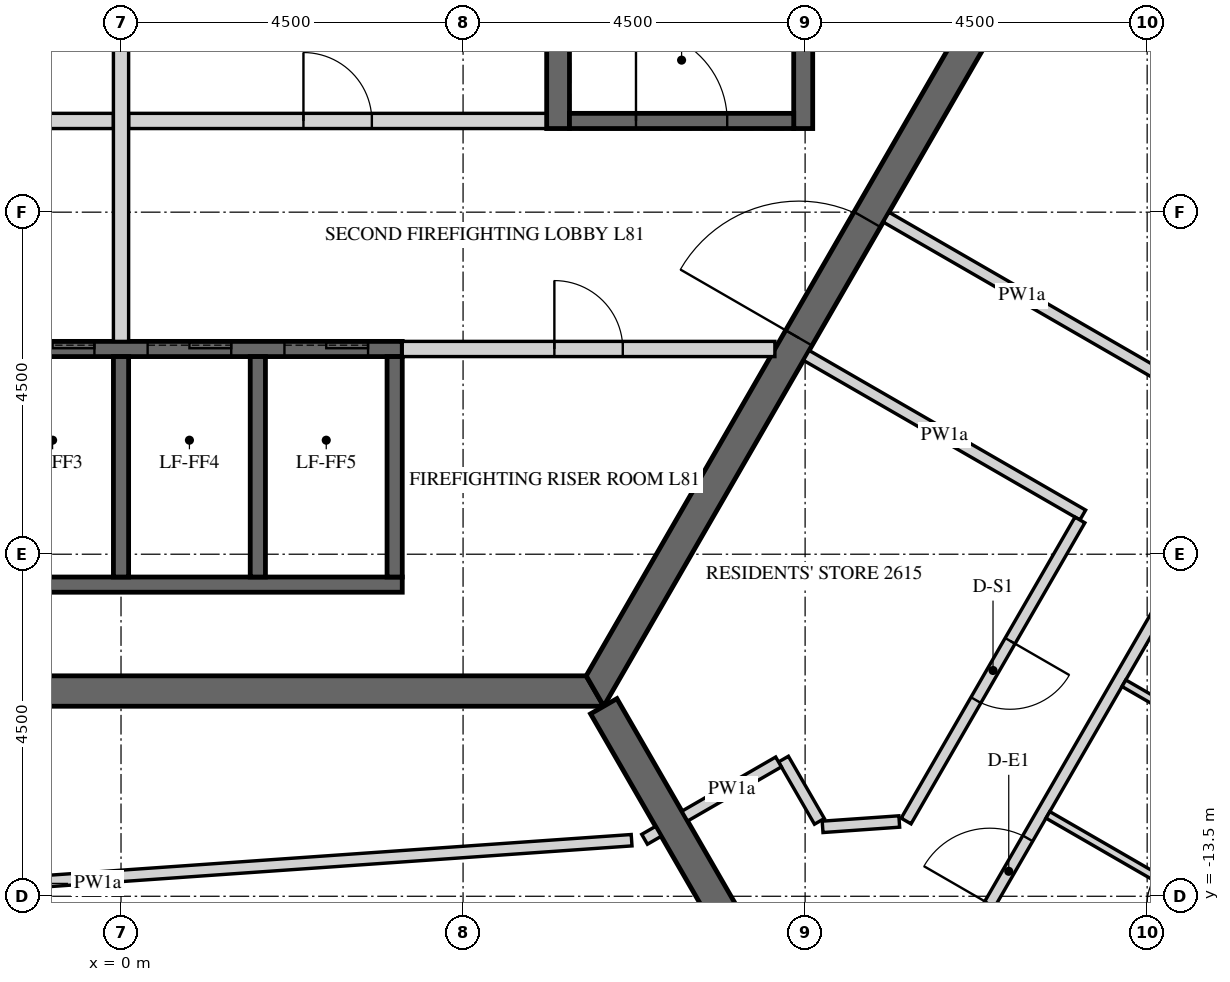
"""IFC4 building model, lengths in metres.
Left out: names, types, materials, properties, quantities, classifications, styles, units other than length and angle.
Written with IfcOpenShell. Run it as: python <this file> out.ifc"""

import sys

from ifc_helpers import new_model, si_unit, direction, frame, frame_2d, origin, place, context, subcontext, project, spatial, polyline, rectangle, outline, extrude, element, fill, save


model = new_model("IFC4")
c1 = context("Model", 3, precision=1e-05, world=origin(), true_north=direction((0.0, 1.0)))
c2 = subcontext(c1, "Body", "Model", "MODEL_VIEW")
j1 = project(units=[si_unit("LENGTHUNIT", "METRE"), si_unit("PLANEANGLEUNIT", "RADIAN")], contexts=[c1])
p1 = place(None, origin())
s1 = spatial("IfcSite", under=j1, at=p1, CompositionType="ELEMENT")
p2 = place(p1, origin())
s2 = spatial("IfcBuilding", under=s1, at=p2, CompositionType="ELEMENT")
p3 = place(p2, frame((0.0, 0.0, 334.2)))
s3 = spatial("IfcBuildingStorey", under=s2, at=p3, CompositionType="ELEMENT", Elevation=334.2)
p4 = place(p3, frame((-6.235, -10.8, -0.15), z_axis=(0.0, 0.0, 1.0), x_axis=(1.0, 0.0, 0.0)))
e1 = element("IfcWall", 1, at=p4, inside=s3, PredefinedType="SHEAR", context=c2, shape_type="SweptSolid", body=[
    extrude(outline(polyline([(-0.115, -0.2), (12.586, -0.2), (12.355, 0.2), (0.115, 0.2), (-0.115, -0.2)])), origin(), (0.0, 0.0, 1.0), 3.75),
])
p5 = place(p3, frame((6.235, -10.8, -0.15), z_axis=(0.0, 0.0, 1.0), x_axis=(0.499996419489, 0.866027470984, 0.0)))
e2 = element("IfcWall", 2, at=p5, inside=s3, PredefinedType="SHEAR", context=c2, shape_type="SweptSolid", body=[
    extrude(outline(polyline([(-0.115, -0.2), (12.586, -0.2), (12.355, 0.2), (0.115, 0.2), (-0.115, -0.2)])), origin(), (0.0, 0.0, 1.0), 3.75),
])
p6 = place(p5, frame((5.364, 0.0, 0.15)))
e3 = element("IfcOpeningElement", 3, at=p6, cuts=e2, PredefinedType="OPENING", context=c2, shape_type="SweptSolid", body=[
    extrude(rectangle(XDim=1.8, YDim=2.4, at=frame_2d((0.9, 1.2))), frame((0.0, 0.21, 0.0), z_axis=(0.0, -1.0, 0.0), x_axis=(1.0, 0.0, 0.0)), (0.0, 0.0, 1.0), 0.42),
])
p7 = place(p3, frame((6.351, -11.0, -0.15), z_axis=(0.0, 0.0, 1.0), x_axis=(0.499998894578, -0.866026041999, 0.0)))
e4 = element("IfcWall", 4, at=p7, inside=s3, PredefinedType="SHEAR", context=c2, shape_type="SweptSolid", body=[
    extrude(rectangle(XDim=15.544, YDim=0.4, at=frame_2d((7.772, 0.0))), origin(), (0.0, 0.0, 1.0), 3.75),
])
p8 = place(p7, frame((6.872, 0.0, 0.15)))
e5 = element("IfcOpeningElement", 5, at=p8, cuts=e4, PredefinedType="OPENING", context=c2, shape_type="SweptSolid", body=[
    extrude(rectangle(XDim=1.8, YDim=2.4, at=frame_2d((0.9, 1.2))), frame((0.0, 0.21, 0.0), z_axis=(0.0, -1.0, 0.0), x_axis=(1.0, 0.0, 0.0)), (0.0, 0.0, 1.0), 0.42),
])
p9 = place(p3, frame((-5.5, -6.3, -0.25), z_axis=(0.0, 0.0, 1.0), x_axis=(1.0, 0.0, 0.0)))
e6 = element("IfcWall", 6, at=p9, inside=s3, PredefinedType="SHEAR", context=c2, shape_type="SweptSolid", body=[
    extrude(rectangle(XDim=9.2, YDim=0.2, at=frame_2d((4.6, 0.0))), origin(), (0.0, 0.0, 1.0), 3.9),
])
p10 = place(p9, frame((0.45, 0.0, 0.25)))
e7 = element("IfcOpeningElement", 7, at=p10, cuts=e6, PredefinedType="OPENING", context=c2, shape_type="SweptSolid", body=[
    extrude(rectangle(XDim=1.1, YDim=2.1, at=frame_2d((0.55, 1.05))), frame((0.0, 0.11, 0.0), z_axis=(0.0, -1.0, 0.0), x_axis=(1.0, 0.0, 0.0)), (0.0, 0.0, 1.0), 0.22),
])
p11 = place(p9, frame((2.25, 0.0, 0.25)))
e8 = element("IfcOpeningElement", 8, at=p11, cuts=e6, PredefinedType="OPENING", context=c2, shape_type="SweptSolid", body=[
    extrude(rectangle(XDim=1.1, YDim=2.1, at=frame_2d((0.55, 1.05))), frame((0.0, 0.11, 0.0), z_axis=(0.0, -1.0, 0.0), x_axis=(1.0, 0.0, 0.0)), (0.0, 0.0, 1.0), 0.22),
])
p12 = place(p9, frame((4.05, 0.0, 0.25)))
e9 = element("IfcOpeningElement", 9, at=p12, cuts=e6, PredefinedType="OPENING", context=c2, shape_type="SweptSolid", body=[
    extrude(rectangle(XDim=1.1, YDim=2.1, at=frame_2d((0.55, 1.05))), frame((0.0, 0.11, 0.0), z_axis=(0.0, -1.0, 0.0), x_axis=(1.0, 0.0, 0.0)), (0.0, 0.0, 1.0), 0.22),
])
p13 = place(p9, frame((5.85, 0.0, 0.25)))
e10 = element("IfcOpeningElement", 10, at=p13, cuts=e6, PredefinedType="OPENING", context=c2, shape_type="SweptSolid", body=[
    extrude(rectangle(XDim=1.1, YDim=2.1, at=frame_2d((0.55, 1.05))), frame((0.0, 0.11, 0.0), z_axis=(0.0, -1.0, 0.0), x_axis=(1.0, 0.0, 0.0)), (0.0, 0.0, 1.0), 0.22),
])
p14 = place(p9, frame((7.65, 0.0, 0.25)))
e11 = element("IfcOpeningElement", 11, at=p14, cuts=e6, PredefinedType="OPENING", context=c2, shape_type="SweptSolid", body=[
    extrude(rectangle(XDim=1.1, YDim=2.1, at=frame_2d((0.55, 1.05))), frame((0.0, 0.11, 0.0), z_axis=(0.0, -1.0, 0.0), x_axis=(1.0, 0.0, 0.0)), (0.0, 0.0, 1.0), 0.22),
])
p15 = place(p3, frame((-5.5, -9.4, -0.25), z_axis=(0.0, 0.0, 1.0), x_axis=(1.0, 0.0, 0.0)))
e12 = element("IfcWall", 12, at=p15, inside=s3, PredefinedType="SHEAR", context=c2, shape_type="SweptSolid", body=[
    extrude(rectangle(XDim=9.2, YDim=0.2, at=frame_2d((4.6, 0.0))), origin(), (0.0, 0.0, 1.0), 3.9),
])
for number, where, z_axis, x_axis in (
    (13, (0.0, -9.3, -0.25), (0.0, 0.0, 1.0), (0.0, 1.0, 0.0)),
    (14, (1.8, -9.3, -0.25), (0.0, 0.0, 1.0), (0.0, 1.0, 0.0)),
    (15, (3.6, -9.3, -0.25), (0.0, 0.0, 1.0), (0.0, 1.0, 0.0)),
):
    element("IfcWall", number, at=place(p3, frame(where, z_axis=z_axis, x_axis=x_axis)), inside=s3, PredefinedType="SHEAR", context=c2, shape_type="SweptSolid", body=[
        extrude(rectangle(XDim=2.9, YDim=0.2, at=frame_2d((1.45, 0.0))), origin(), (0.0, 0.0, 1.0), 3.9),
    ])
p16 = place(p3, frame((-5.6, -3.3, 0.0), z_axis=(0.0, 0.0, 1.0), x_axis=(1.0, 0.0, 0.0)))
e16 = element("IfcWall", 16, at=p16, inside=s3, PredefinedType="PARTITIONING", context=c2, shape_type="SweptSolid", body=[
    extrude(rectangle(XDim=5.5, YDim=0.2, at=frame_2d((2.75, 0.0))), origin(), (0.0, 0.0, 1.0), 3.65),
])
p17 = place(p16, frame((2.3, 0.0, 0.0)))
e17 = element("IfcOpeningElement", 17, at=p17, cuts=e16, PredefinedType="OPENING", context=c2, shape_type="SweptSolid", body=[
    extrude(rectangle(XDim=0.9, YDim=2.1, at=frame_2d((0.45, 1.05))), frame((0.0, 0.11, 0.0), z_axis=(0.0, -1.0, 0.0), x_axis=(1.0, 0.0, 0.0)), (0.0, 0.0, 1.0), 0.22),
])
p18 = place(p3, frame((0.1, -3.3, 0.0), z_axis=(0.0, 0.0, 1.0), x_axis=(1.0, 0.0, 0.0)))
e18 = element("IfcWall", 18, at=p18, inside=s3, PredefinedType="PARTITIONING", context=c2, shape_type="SweptSolid", body=[
    extrude(rectangle(XDim=5.5, YDim=0.2, at=frame_2d((2.75, 0.0))), origin(), (0.0, 0.0, 1.0), 3.65),
])
p19 = place(p18, frame((2.3, 0.0, 0.0)))
e19 = element("IfcOpeningElement", 19, at=p19, cuts=e18, PredefinedType="OPENING", context=c2, shape_type="SweptSolid", body=[
    extrude(rectangle(XDim=0.9, YDim=2.1, at=frame_2d((0.45, 1.05))), frame((0.0, 0.11, 0.0), z_axis=(0.0, -1.0, 0.0), x_axis=(1.0, 0.0, 0.0)), (0.0, 0.0, 1.0), 0.22),
])
p20 = place(p3, frame((0.0, -6.2, 0.0), z_axis=(0.0, 0.0, 1.0), x_axis=(0.0, 1.0, 0.0)))
e20 = element("IfcWall", 20, at=p20, inside=s3, PredefinedType="PARTITIONING", context=c2, shape_type="SweptSolid", body=[
    extrude(rectangle(XDim=6.1, YDim=0.2, at=frame_2d((3.05, 0.0))), origin(), (0.0, 0.0, 1.0), 3.65),
])
p21 = place(p3, frame((3.7, -6.3, 0.0), z_axis=(0.0, 0.0, 1.0), x_axis=(1.0, 0.0, 0.0)))
e21 = element("IfcWall", 21, at=p21, inside=s3, PredefinedType="PARTITIONING", context=c2, shape_type="SweptSolid", body=[
    extrude(rectangle(XDim=4.903, YDim=0.2, at=frame_2d((2.451, 0.0))), origin(), (0.0, 0.0, 1.0), 3.65),
])
p22 = place(p21, frame((2.001, 0.0, 0.0)))
e22 = element("IfcOpeningElement", 22, at=p22, cuts=e21, PredefinedType="OPENING", context=c2, shape_type="SweptSolid", body=[
    extrude(rectangle(XDim=0.9, YDim=2.1, at=frame_2d((0.45, 1.05))), frame((0.0, 0.11, 0.0), z_axis=(0.0, -1.0, 0.0), x_axis=(1.0, 0.0, 0.0)), (0.0, 0.0, 1.0), 0.22),
])
p23 = place(p3, frame((5.75, -3.4, -0.25), z_axis=(0.0, 0.0, 1.0), x_axis=(0.0, 1.0, 0.0)))
e23 = element("IfcWall", 23, at=p23, inside=s3, PredefinedType="SHEAR", context=c2, shape_type="SweptSolid", body=[
    extrude(rectangle(XDim=6.8, YDim=0.3, at=frame_2d((3.4, 0.0))), origin(), (0.0, 0.0, 1.0), 3.9),
])
p24 = place(p3, frame((8.975, -3.4, -0.25), z_axis=(0.0, 0.0, 1.0), x_axis=(0.0, 1.0, 0.0)))
e24 = element("IfcWall", 24, at=p24, inside=s3, PredefinedType="SHEAR", context=c2, shape_type="SweptSolid", body=[
    extrude(rectangle(XDim=6.8, YDim=0.25, at=frame_2d((3.4, 0.0))), origin(), (0.0, 0.0, 1.0), 3.9),
])
p25 = place(p3, frame((5.9, -3.3, -0.25), z_axis=(0.0, 0.0, 1.0), x_axis=(1.0, 0.0, 0.0)))
e25 = element("IfcWall", 25, at=p25, inside=s3, PredefinedType="SHEAR", context=c2, shape_type="SweptSolid", body=[
    extrude(rectangle(XDim=2.95, YDim=0.2, at=frame_2d((1.475, 0.0))), origin(), (0.0, 0.0, 1.0), 3.9),
])
p26 = place(p25, frame((0.875, 0.0, 0.25)))
e26 = element("IfcOpeningElement", 26, at=p26, cuts=e25, PredefinedType="OPENING", context=c2, shape_type="SweptSolid", body=[
    extrude(rectangle(XDim=1.2, YDim=2.4, at=frame_2d((0.6, 1.2))), frame((0.0, 0.11, 0.0), z_axis=(0.0, -1.0, 0.0), x_axis=(1.0, 0.0, 0.0)), (0.0, 0.0, 1.0), 0.22),
])
p27 = place(p3, frame((7.07, -12.646, 0.0), z_axis=(0.0, 0.0, 1.0), x_axis=(-0.866378867349, -0.499387282788, 0.0)))
e27 = element("IfcWall", 27, at=p27, inside=s3, PredefinedType="PARTITIONING", context=c2, shape_type="SweptSolid", body=[
    extrude(rectangle(XDim=0.21, YDim=0.15, at=frame_2d((0.105, 0.0))), origin(), (0.0, 0.0, 1.0), 2.838),
])
p28 = place(p3, frame((6.717, -12.762, 0.0), z_axis=(0.0, 0.0, 1.0), x_axis=(-0.99756375843, -0.069760646978, 0.0)))
e28 = element("IfcWall", 28, at=p28, inside=s3, PredefinedType="PARTITIONING", context=c2, shape_type="SweptSolid", body=[
    extrude(rectangle(XDim=16.284, YDim=0.15, at=frame_2d((8.142, 0.0))), origin(), (0.0, 0.0, 1.0), 2.838),
])
p29 = place(p28, frame((7.692, 0.0, 0.0)))
e29 = element("IfcOpeningElement", 29, at=p29, cuts=e28, PredefinedType="OPENING", context=c2, shape_type="SweptSolid", body=[
    extrude(rectangle(XDim=0.9, YDim=2.1, at=frame_2d((0.45, 1.05))), frame((0.0, 0.085, 0.0), z_axis=(0.0, -1.0, 0.0), x_axis=(1.0, 0.0, 0.0)), (0.0, 0.0, 1.0), 0.17),
])
p30 = place(p3, frame((11.229, -13.951, 0.0), z_axis=(0.0, 0.0, 1.0), x_axis=(0.499997948852, 0.866026588012, 0.0)))
e30 = element("IfcWall", 30, at=p30, inside=s3, PredefinedType="PARTITIONING", context=c2, shape_type="SweptSolid", body=[
    extrude(rectangle(XDim=14.677, YDim=0.15, at=frame_2d((7.339, 0.0))), origin(), (0.0, 0.0, 1.0), 2.838),
])
p31 = place(p30, frame((0.4, 0.0, 0.0)))
e31 = element("IfcOpeningElement", 31, at=p31, cuts=e30, PredefinedType="OPENING", context=c2, shape_type="SweptSolid", body=[
    extrude(rectangle(XDim=1.0, YDim=2.1, at=frame_2d((0.5, 1.05))), frame((0.0, 0.085, 0.0), z_axis=(0.0, -1.0, 0.0), x_axis=(1.0, 0.0, 0.0)), (0.0, 0.0, 1.0), 0.17),
])
p32 = place(p30, frame((13.527, 0.0, 0.0)))
e32 = element("IfcOpeningElement", 32, at=p32, cuts=e30, PredefinedType="OPENING", context=c2, shape_type="SweptSolid", body=[
    extrude(rectangle(XDim=1.0, YDim=2.1, at=frame_2d((0.5, 1.05))), frame((0.0, 0.085, 0.0), z_axis=(0.0, -1.0, 0.0), x_axis=(1.0, 0.0, 0.0)), (0.0, 0.0, 1.0), 0.17),
])
p33 = place(p3, frame((9.016, -6.384, 0.0), z_axis=(0.0, 0.0, 1.0), x_axis=(0.866023935413, -0.500002543286, 0.0)))
e33 = element("IfcWall", 33, at=p33, inside=s3, PredefinedType="PARTITIONING", context=c2, shape_type="SweptSolid", body=[
    extrude(rectangle(XDim=4.2, YDim=0.15, at=frame_2d((2.1, 0.0))), origin(), (0.0, 0.0, 1.0), 2.838),
])
p34 = place(p3, frame((12.615, -8.549, 0.0), z_axis=(0.0, 0.0, 1.0), x_axis=(-0.499985850067, -0.866033573098, 0.0)))
e34 = element("IfcWall", 34, at=p34, inside=s3, PredefinedType="PARTITIONING", context=c2, shape_type="SweptSolid", body=[
    extrude(rectangle(XDim=4.573, YDim=0.15, at=frame_2d((2.287, 0.0))), origin(), (0.0, 0.0, 1.0), 2.838),
])
p35 = place(p34, frame((1.837, 0.0, 0.0)))
e35 = element("IfcOpeningElement", 35, at=p35, cuts=e34, PredefinedType="OPENING", context=c2, shape_type="SweptSolid", body=[
    extrude(rectangle(XDim=0.9, YDim=2.1, at=frame_2d((0.45, 1.05))), frame((0.0, 0.085, 0.0), z_axis=(0.0, -1.0, 0.0), x_axis=(1.0, 0.0, 0.0)), (0.0, 0.0, 1.0), 0.17),
])
p36 = place(p3, frame((10.239, -12.516, 0.0), z_axis=(0.0, 0.0, 1.0), x_axis=(-0.997561825928, -0.069788275888, 0.0)))
e36 = element("IfcWall", 36, at=p36, inside=s3, PredefinedType="PARTITIONING", context=c2, shape_type="SweptSolid", body=[
    extrude(rectangle(XDim=1.011, YDim=0.15, at=frame_2d((0.505, 0.0))), origin(), (0.0, 0.0, 1.0), 2.838),
])
p37 = place(p3, frame((9.188, -12.515, 0.0), z_axis=(0.0, 0.0, 1.0), x_axis=(-0.499998034377, 0.866026538634, 0.0)))
e37 = element("IfcWall", 37, at=p37, inside=s3, PredefinedType="PARTITIONING", context=c2, shape_type="SweptSolid", body=[
    extrude(rectangle(XDim=0.946, YDim=0.15, at=frame_2d((0.473, 0.0))), origin(), (0.0, 0.0, 1.0), 2.838),
])
p38 = place(p3, frame((8.65, -11.733, 0.0), z_axis=(0.0, 0.0, 1.0), x_axis=(-0.866062911188, -0.499935029643, 0.0)))
e38 = element("IfcWall", 38, at=p38, inside=s3, PredefinedType="PARTITIONING", context=c2, shape_type="SweptSolid", body=[
    extrude(rectangle(XDim=1.425, YDim=0.15, at=frame_2d((0.712, 0.0))), origin(), (0.0, 0.0, 1.0), 2.838),
])
p39 = place(p3, frame((13.638, -6.628, 0.0), z_axis=(0.0, 0.0, 1.0), x_axis=(-0.866034795751, 0.499983732284, 0.0)))
e39 = element("IfcWall", 39, at=p39, inside=s3, PredefinedType="PARTITIONING", context=c2, shape_type="SweptSolid", body=[
    extrude(rectangle(XDim=4.125, YDim=0.15, at=frame_2d((2.062, 0.0))), origin(), (0.0, 0.0, 1.0), 2.838),
])
p40 = place(p3, frame((13.194, -10.697, 0.0), z_axis=(0.0, 0.0, 1.0), x_axis=(0.866019999656, -0.500009360108, 0.0)))
e40 = element("IfcWall", 40, at=p40, inside=s3, PredefinedType="PARTITIONING", context=c2, shape_type="SweptSolid", body=[
    extrude(rectangle(XDim=4.125, YDim=0.1, at=frame_2d((2.062, 0.0))), origin(), (0.0, 0.0, 1.0), 2.838),
])
p41 = place(p3, frame((15.766, -14.492, 0.0), z_axis=(0.0, 0.0, 1.0), x_axis=(-0.866019999656, 0.500009360108, 0.0)))
e41 = element("IfcWall", 41, at=p41, inside=s3, PredefinedType="PARTITIONING", context=c2, shape_type="SweptSolid", body=[
    extrude(rectangle(XDim=4.125, YDim=0.1, at=frame_2d((2.062, 0.0))), origin(), (0.0, 0.0, 1.0), 2.838),
])
p42 = place(p41, frame((1.7, 0.0, 0.0)))
e42 = element("IfcOpeningElement", 42, at=p42, cuts=e41, PredefinedType="OPENING", context=c2, shape_type="SweptSolid", body=[
    extrude(rectangle(XDim=0.8, YDim=2.1, at=frame_2d((0.4, 1.05))), frame((0.0, 0.06, 0.0), z_axis=(0.0, -1.0, 0.0), x_axis=(1.0, 0.0, 0.0)), (0.0, 0.0, 1.0), 0.12),
])
p43 = place(p6, origin())
e43 = element("IfcDoor", 43, at=p43, inside=s3, OperationType="DOUBLE_DOOR_SINGLE_SWING", PredefinedType="DOOR", context=c2, shape_type="SweptSolid", body=[
    extrude(rectangle(XDim=1.8, YDim=2.4, at=frame_2d((0.9, 1.2))), frame((0.0, 0.025, 0.0), z_axis=(0.0, -1.0, 0.0), x_axis=(1.0, 0.0, 0.0)), (0.0, 0.0, 1.0), 0.05),
])
fill(e3, e43)
p44 = place(p19, origin())
e44 = element("IfcDoor", 44, at=p44, inside=s3, OperationType="SINGLE_SWING_LEFT", PredefinedType="DOOR", context=c2, shape_type="SweptSolid", body=[
    extrude(rectangle(XDim=0.9, YDim=2.1, at=frame_2d((0.45, 1.05))), frame((0.0, 0.025, 0.0), z_axis=(0.0, -1.0, 0.0), x_axis=(1.0, 0.0, 0.0)), (0.0, 0.0, 1.0), 0.05),
])
fill(e19, e44)
p45 = place(p22, origin())
e45 = element("IfcDoor", 45, at=p45, inside=s3, OperationType="SINGLE_SWING_LEFT", PredefinedType="DOOR", context=c2, shape_type="SweptSolid", body=[
    extrude(rectangle(XDim=0.9, YDim=2.1, at=frame_2d((0.45, 1.05))), frame((0.0, 0.025, 0.0), z_axis=(0.0, -1.0, 0.0), x_axis=(1.0, 0.0, 0.0)), (0.0, 0.0, 1.0), 0.05),
])
fill(e22, e45)
p46 = place(p26, origin())
e46 = element("IfcDoor", 46, at=p46, inside=s3, OperationType="SINGLE_SWING_LEFT", PredefinedType="DOOR", context=c2, shape_type="SweptSolid", body=[
    extrude(rectangle(XDim=1.2, YDim=2.4, at=frame_2d((0.6, 1.2))), frame((0.0, 0.025, 0.0), z_axis=(0.0, -1.0, 0.0), x_axis=(1.0, 0.0, 0.0)), (0.0, 0.0, 1.0), 0.05),
])
fill(e26, e46)
p47 = place(p12, origin())
e47 = element("IfcDoor", 47, at=p47, inside=s3, OperationType="SLIDING_TO_LEFT", PredefinedType="DOOR", context=c2, shape_type="SweptSolid", body=[
    extrude(rectangle(XDim=1.1, YDim=2.1, at=frame_2d((0.55, 1.05))), frame((0.0, 0.025, 0.0), z_axis=(0.0, -1.0, 0.0), x_axis=(1.0, 0.0, 0.0)), (0.0, 0.0, 1.0), 0.05),
])
fill(e9, e47)
p48 = place(p13, origin())
e48 = element("IfcDoor", 48, at=p48, inside=s3, OperationType="SLIDING_TO_LEFT", PredefinedType="DOOR", context=c2, shape_type="SweptSolid", body=[
    extrude(rectangle(XDim=1.1, YDim=2.1, at=frame_2d((0.55, 1.05))), frame((0.0, 0.025, 0.0), z_axis=(0.0, -1.0, 0.0), x_axis=(1.0, 0.0, 0.0)), (0.0, 0.0, 1.0), 0.05),
])
fill(e10, e48)
p49 = place(p14, origin())
e49 = element("IfcDoor", 49, at=p49, inside=s3, OperationType="SLIDING_TO_LEFT", PredefinedType="DOOR", context=c2, shape_type="SweptSolid", body=[
    extrude(rectangle(XDim=1.1, YDim=2.1, at=frame_2d((0.55, 1.05))), frame((0.0, 0.025, 0.0), z_axis=(0.0, -1.0, 0.0), x_axis=(1.0, 0.0, 0.0)), (0.0, 0.0, 1.0), 0.05),
])
fill(e11, e49)
p50 = place(p31, origin())
e50 = element("IfcDoor", 50, at=p50, inside=s3, OperationType="SINGLE_SWING_RIGHT", PredefinedType="DOOR", context=c2, shape_type="SweptSolid", body=[
    extrude(rectangle(XDim=1.0, YDim=2.1, at=frame_2d((0.5, 1.05))), frame((0.0, 0.025, 0.0), z_axis=(0.0, -1.0, 0.0), x_axis=(1.0, 0.0, 0.0)), (0.0, 0.0, 1.0), 0.05),
])
fill(e31, e50)
p51 = place(p35, origin())
e51 = element("IfcDoor", 51, at=p51, inside=s3, OperationType="SINGLE_SWING_LEFT", PredefinedType="DOOR", context=c2, shape_type="SweptSolid", body=[
    extrude(rectangle(XDim=0.9, YDim=2.1, at=frame_2d((0.45, 1.05))), frame((0.0, 0.025, 0.0), z_axis=(0.0, -1.0, 0.0), x_axis=(1.0, 0.0, 0.0)), (0.0, 0.0, 1.0), 0.05),
])
fill(e35, e51)
save(model, sys.argv[1])
